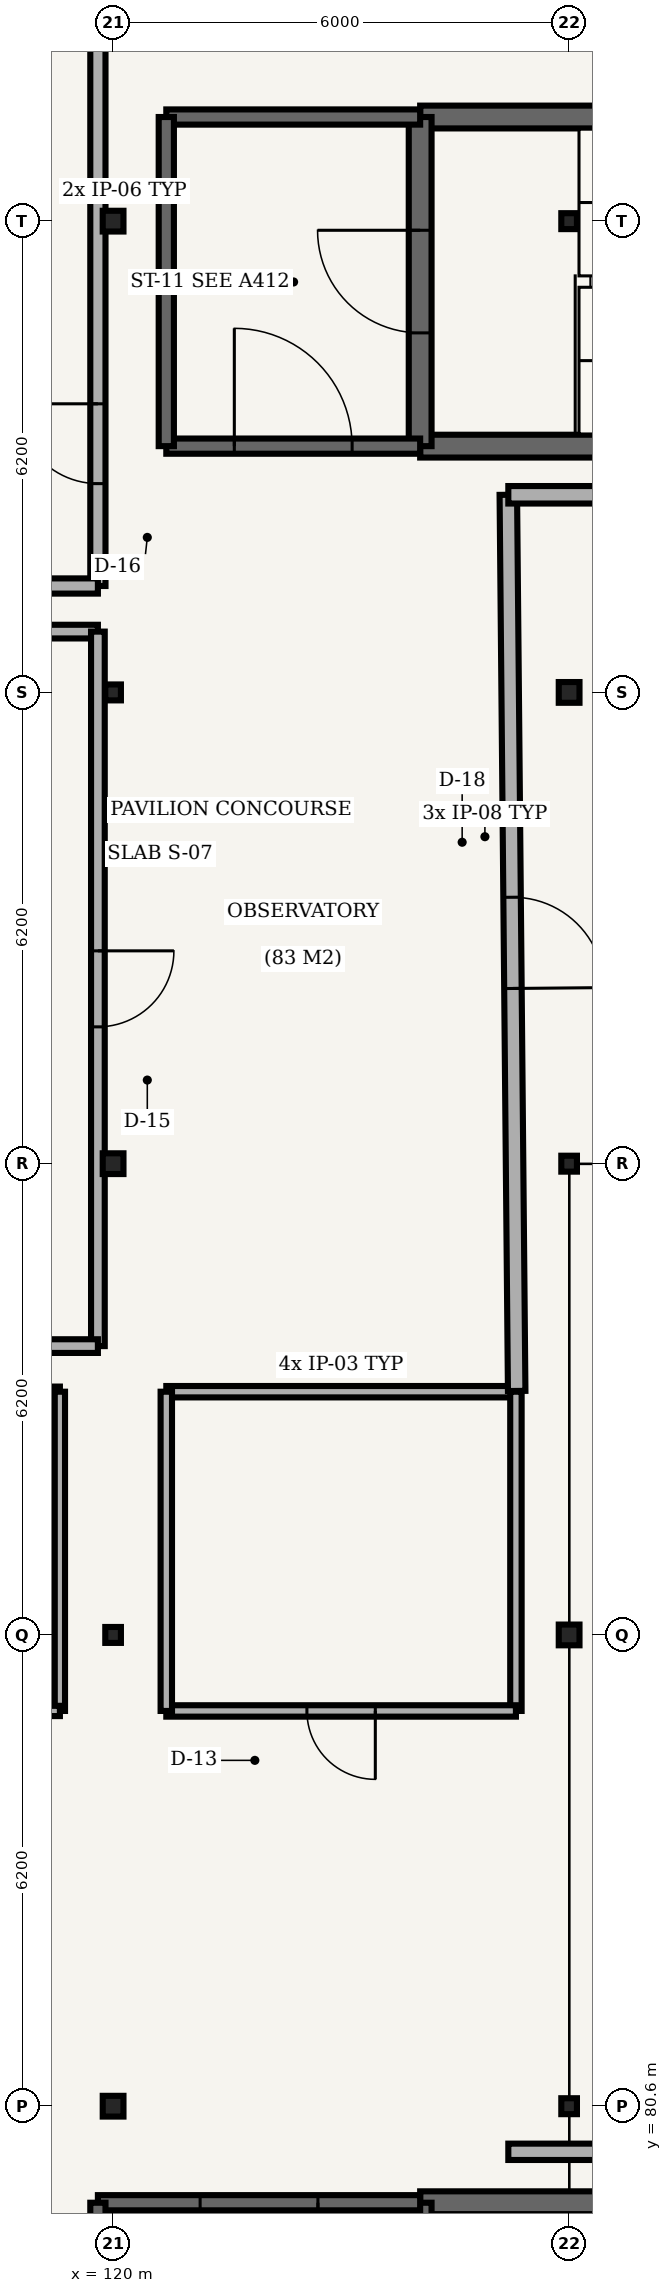
"""IFC4 building model, lengths in metres.
Left out: names, types, materials, properties, quantities, classifications, styles, units other than length and angle.
Written with IfcOpenShell. Run it as: python <this file> out.ifc"""

import sys

from ifc_helpers import new_model, si_unit, direction, frame, frame_2d, origin, origin_2d, place, context, subcontext, project, spatial, rectangle, hollow_circle, i_section, extrude, element, fill, save


model = new_model("IFC4")
c1 = context("Model", 3, precision=1e-05, world=origin(), true_north=direction((0.0, 1.0)))
c2 = subcontext(c1, "Body", "Model", "MODEL_VIEW")
j1 = project(units=[si_unit("LENGTHUNIT", "METRE"), si_unit("PLANEANGLEUNIT", "RADIAN")], contexts=[c1])
p1 = place(None, origin())
s1 = spatial("IfcSite", under=j1, at=p1, CompositionType="ELEMENT")
p2 = place(p1, origin())
s2 = spatial("IfcBuilding", under=s1, at=p2, CompositionType="ELEMENT")
p3 = place(p2, frame((0.0, 0.0, 25.2)))
s3 = spatial("IfcBuildingStorey", under=s2, at=p3, CompositionType="ELEMENT", Elevation=25.2)
p4 = place(p3, frame((120.0, 80.6, 0.0), z_axis=(0.0, 0.0, 1.0), x_axis=(1.0, 0.0, 0.0)))
e1 = element("IfcColumn", 1, at=p4, inside=s3, PredefinedType="COLUMN", context=c2, shape_type="SweptSolid", body=[
    extrude(hollow_circle(Radius=0.136, WallThickness=0.01, at=origin_2d()), origin(), (0.0, 0.0, 1.0), 4.41),
])
p5 = place(p3, frame((120.0, 86.8, 0.0), z_axis=(0.0, 0.0, 1.0), x_axis=(1.0, 0.0, 0.0)))
e2 = element("IfcColumn", 2, at=p5, inside=s3, PredefinedType="COLUMN", context=c2, shape_type="SweptSolid", body=[
    extrude(i_section(OverallWidth=0.206, OverallDepth=0.21, WebThickness=0.01, FlangeThickness=0.014, FilletRadius=0.01, at=origin_2d()), origin(), (0.0, 0.0, 1.0), 4.41),
])
p6 = place(p3, frame((120.0, 93.0, 0.0), z_axis=(0.0, 0.0, 1.0), x_axis=(1.0, 0.0, 0.0)))
e3 = element("IfcColumn", 3, at=p6, inside=s3, PredefinedType="COLUMN", context=c2, shape_type="SweptSolid", body=[
    extrude(hollow_circle(Radius=0.136, WallThickness=0.01, at=origin_2d()), origin(), (0.0, 0.0, 1.0), 4.41),
])
p7 = place(p3, frame((120.0, 99.2, 0.0), z_axis=(0.0, 0.0, 1.0), x_axis=(1.0, 0.0, 0.0)))
e4 = element("IfcColumn", 4, at=p7, inside=s3, PredefinedType="COLUMN", context=c2, shape_type="SweptSolid", body=[
    extrude(i_section(OverallWidth=0.206, OverallDepth=0.21, WebThickness=0.01, FlangeThickness=0.014, FilletRadius=0.01, at=origin_2d()), origin(), (0.0, 0.0, 1.0), 4.41),
])
p8 = place(p3, frame((120.0, 105.4, 0.0), z_axis=(0.0, 0.0, 1.0), x_axis=(1.0, 0.0, 0.0)))
e5 = element("IfcColumn", 5, at=p8, inside=s3, PredefinedType="COLUMN", context=c2, shape_type="SweptSolid", body=[
    extrude(hollow_circle(Radius=0.136, WallThickness=0.01, at=origin_2d()), origin(), (0.0, 0.0, 1.0), 4.41),
])
p9 = place(p3, frame((126.0, 80.6, 0.0), z_axis=(0.0, 0.0, 1.0), x_axis=(1.0, 0.0, 0.0)))
e6 = element("IfcColumn", 6, at=p9, inside=s3, PredefinedType="COLUMN", context=c2, shape_type="SweptSolid", body=[
    extrude(i_section(OverallWidth=0.206, OverallDepth=0.21, WebThickness=0.01, FlangeThickness=0.014, FilletRadius=0.01, at=origin_2d()), origin(), (0.0, 0.0, 1.0), 4.41),
])
p10 = place(p3, frame((126.0, 86.8, 0.0), z_axis=(0.0, 0.0, 1.0), x_axis=(1.0, 0.0, 0.0)))
e7 = element("IfcColumn", 7, at=p10, inside=s3, PredefinedType="COLUMN", context=c2, shape_type="SweptSolid", body=[
    extrude(hollow_circle(Radius=0.136, WallThickness=0.01, at=origin_2d()), origin(), (0.0, 0.0, 1.0), 4.41),
])
p11 = place(p3, frame((126.0, 93.0, 0.0), z_axis=(0.0, 0.0, 1.0), x_axis=(1.0, 0.0, 0.0)))
e8 = element("IfcColumn", 8, at=p11, inside=s3, PredefinedType="COLUMN", context=c2, shape_type="SweptSolid", body=[
    extrude(i_section(OverallWidth=0.206, OverallDepth=0.21, WebThickness=0.01, FlangeThickness=0.014, FilletRadius=0.01, at=origin_2d()), origin(), (0.0, 0.0, 1.0), 4.41),
])
p12 = place(p3, frame((126.0, 99.2, 0.0), z_axis=(0.0, 0.0, 1.0), x_axis=(1.0, 0.0, 0.0)))
e9 = element("IfcColumn", 9, at=p12, inside=s3, PredefinedType="COLUMN", context=c2, shape_type="SweptSolid", body=[
    extrude(hollow_circle(Radius=0.136, WallThickness=0.01, at=origin_2d()), origin(), (0.0, 0.0, 1.0), 4.41),
])
p13 = place(p3, frame((126.0, 105.4, 0.0), z_axis=(0.0, 0.0, 1.0), x_axis=(1.0, 0.0, 0.0)))
e10 = element("IfcColumn", 10, at=p13, inside=s3, PredefinedType="COLUMN", context=c2, shape_type="SweptSolid", body=[
    extrude(i_section(OverallWidth=0.206, OverallDepth=0.21, WebThickness=0.01, FlangeThickness=0.014, FilletRadius=0.01, at=origin_2d()), origin(), (0.0, 0.0, 1.0), 4.41),
])
p14 = place(p3, frame((132.56, 79.33, 0.0), z_axis=(0.0, 0.0, 1.0), x_axis=(-1.0, 0.0, 0.0)))
e11 = element("IfcWall", 11, at=p14, inside=s3, PredefinedType="SHEAR", context=c2, shape_type="SweptSolid", body=[
    extrude(rectangle(XDim=8.52, YDim=0.3, at=frame_2d((4.26, 0.0))), origin(), (0.0, 0.0, 1.0), 3.85),
])
p15 = place(p3, frame((124.04, 79.33, 0.0), z_axis=(0.0, 0.0, 1.0), x_axis=(0.0, -1.0, 0.0)))
e12 = element("IfcWall", 12, at=p15, inside=s3, PredefinedType="SHEAR", context=c2, shape_type="SweptSolid", body=[
    extrude(rectangle(XDim=4.29, YDim=0.3, at=frame_2d((2.145, 0.0))), origin(), (0.0, 0.0, 1.0), 3.85),
])
p16 = place(p15, frame((1.47, 0.0, 0.0)))
e13 = element("IfcOpeningElement", 13, at=p16, cuts=e12, PredefinedType="OPENING", context=c2, shape_type="SweptSolid", body=[
    extrude(rectangle(XDim=1.35, YDim=2.2, at=frame_2d((0.675, 1.1))), frame((0.0, 0.16, 0.0), z_axis=(0.0, -1.0, 0.0), x_axis=(1.0, 0.0, 0.0)), (0.0, 0.0, 1.0), 0.32),
])
p17 = place(p3, frame((124.04, 79.33, 0.0), z_axis=(0.0, 0.0, 1.0), x_axis=(-1.0, 0.0, 0.0)))
e14 = element("IfcWall", 14, at=p17, inside=s3, PredefinedType="SHEAR", context=c2, shape_type="SweptSolid", body=[
    extrude(rectangle(XDim=4.24, YDim=0.2, at=frame_2d((2.12, 0.0))), origin(), (0.0, 0.0, 1.0), 3.85),
])
p18 = place(p17, frame((1.345, 0.0, 0.0)))
e15 = element("IfcOpeningElement", 15, at=p18, cuts=e14, PredefinedType="OPENING", context=c2, shape_type="SweptSolid", body=[
    extrude(rectangle(XDim=1.55, YDim=2.2, at=frame_2d((0.775, 1.1))), frame((0.0, 0.11, 0.0), z_axis=(0.0, -1.0, 0.0), x_axis=(1.0, 0.0, 0.0)), (0.0, 0.0, 1.0), 0.22),
])
p19 = place(p3, frame((119.8, 79.33, 0.0), z_axis=(0.0, 0.0, 1.0), x_axis=(0.0, -1.0, 0.0)))
e16 = element("IfcWall", 16, at=p19, inside=s3, PredefinedType="SHEAR", context=c2, shape_type="SweptSolid", body=[
    extrude(rectangle(XDim=4.29, YDim=0.2, at=frame_2d((2.145, 0.0))), origin(), (0.0, 0.0, 1.0), 3.85),
])
for number, where, z_axis, x_axis in (
    (17, (124.04, 102.44, 0.0), (0.0, 0.0, 1.0), (1.0, 0.0, 0.0)),
    (18, (132.56, 106.77, 0.0), (0.0, 0.0, 1.0), (-1.0, 0.0, 0.0)),
):
    element("IfcWall", number, at=place(p3, frame(where, z_axis=z_axis, x_axis=x_axis)), inside=s3, PredefinedType="SHEAR", context=c2, shape_type="SweptSolid", body=[
        extrude(rectangle(XDim=8.52, YDim=0.3, at=frame_2d((4.26, 0.0))), origin(), (0.0, 0.0, 1.0), 3.85),
    ])
p20 = place(p3, frame((124.04, 106.77, 0.0), z_axis=(0.0, 0.0, 1.0), x_axis=(0.0, -1.0, 0.0)))
e19 = element("IfcWall", 19, at=p20, inside=s3, PredefinedType="SHEAR", context=c2, shape_type="SweptSolid", body=[
    extrude(rectangle(XDim=4.33, YDim=0.3, at=frame_2d((2.165, 0.0))), origin(), (0.0, 0.0, 1.0), 3.85),
])
p21 = place(p20, frame((1.49, 0.0, 0.0)))
e20 = element("IfcOpeningElement", 20, at=p21, cuts=e19, PredefinedType="OPENING", context=c2, shape_type="SweptSolid", body=[
    extrude(rectangle(XDim=1.35, YDim=2.2, at=frame_2d((0.675, 1.1))), frame((0.0, 0.16, 0.0), z_axis=(0.0, -1.0, 0.0), x_axis=(1.0, 0.0, 0.0)), (0.0, 0.0, 1.0), 0.32),
])
p22 = place(p3, frame((120.7, 102.44, 0.0), z_axis=(0.0, 0.0, 1.0), x_axis=(1.0, 0.0, 0.0)))
e21 = element("IfcWall", 21, at=p22, inside=s3, PredefinedType="SHEAR", context=c2, shape_type="SweptSolid", body=[
    extrude(rectangle(XDim=3.34, YDim=0.2, at=frame_2d((1.67, 0.0))), origin(), (0.0, 0.0, 1.0), 3.85),
])
p23 = place(p22, frame((0.895, 0.0, 0.0)))
e22 = element("IfcOpeningElement", 22, at=p23, cuts=e21, PredefinedType="OPENING", context=c2, shape_type="SweptSolid", body=[
    extrude(rectangle(XDim=1.55, YDim=2.2, at=frame_2d((0.775, 1.1))), frame((0.0, 0.11, 0.0), z_axis=(0.0, -1.0, 0.0), x_axis=(1.0, 0.0, 0.0)), (0.0, 0.0, 1.0), 0.22),
])
p24 = place(p3, frame((124.04, 106.77, 0.0), z_axis=(0.0, 0.0, 1.0), x_axis=(-1.0, 0.0, 0.0)))
e23 = element("IfcWall", 23, at=p24, inside=s3, PredefinedType="SHEAR", context=c2, shape_type="SweptSolid", body=[
    extrude(rectangle(XDim=3.34, YDim=0.2, at=frame_2d((1.67, 0.0))), origin(), (0.0, 0.0, 1.0), 3.85),
])
p25 = place(p3, frame((120.7, 106.77, 0.0), z_axis=(0.0, 0.0, 1.0), x_axis=(0.0, -1.0, 0.0)))
e24 = element("IfcWall", 24, at=p25, inside=s3, PredefinedType="SHEAR", context=c2, shape_type="SweptSolid", body=[
    extrude(rectangle(XDim=4.33, YDim=0.2, at=frame_2d((2.165, 0.0))), origin(), (0.0, 0.0, 1.0), 3.85),
])
p26 = place(p3, frame((114.7, 90.0, 0.0), z_axis=(0.0, 0.0, 1.0), x_axis=(1.0, 0.0, 0.0)))
e25 = element("IfcWall", 25, at=p26, inside=s3, PredefinedType="PARTITIONING", context=c2, shape_type="SweptSolid", body=[
    extrude(rectangle(XDim=4.6, YDim=0.135, at=frame_2d((2.3, 0.0))), origin(), (0.0, 0.0, 1.0), 3.85),
])
p27 = place(p3, frame((119.3, 90.0, 0.0), z_axis=(0.0, 0.0, 1.0), x_axis=(0.0, -1.0, 0.0)))
e26 = element("IfcWall", 26, at=p27, inside=s3, PredefinedType="PARTITIONING", context=c2, shape_type="SweptSolid", body=[
    extrude(rectangle(XDim=4.2, YDim=0.135, at=frame_2d((2.1, 0.0))), origin(), (0.0, 0.0, 1.0), 3.85),
])
p28 = place(p3, frame((119.3, 85.8, 0.0), z_axis=(0.0, 0.0, 1.0), x_axis=(-1.0, 0.0, 0.0)))
e27 = element("IfcWall", 27, at=p28, inside=s3, PredefinedType="PARTITIONING", context=c2, shape_type="SweptSolid", body=[
    extrude(rectangle(XDim=4.6, YDim=0.135, at=frame_2d((2.3, 0.0))), origin(), (0.0, 0.0, 1.0), 3.85),
])
p29 = place(p28, frame((1.05, 0.0, 0.0)))
e28 = element("IfcOpeningElement", 28, at=p29, cuts=e27, PredefinedType="OPENING", context=c2, shape_type="SweptSolid", body=[
    extrude(rectangle(XDim=2.5, YDim=2.1, at=frame_2d((1.25, 1.05))), frame((0.0, 0.077, 0.0), z_axis=(0.0, -1.0, 0.0), x_axis=(1.0, 0.0, 0.0)), (0.0, 0.0, 1.0), 0.155),
])
p30 = place(p3, frame((120.7, 90.0, 0.0), z_axis=(0.0, 0.0, 1.0), x_axis=(1.0, 0.0, 0.0)))
e29 = element("IfcWall", 29, at=p30, inside=s3, PredefinedType="PARTITIONING", context=c2, shape_type="SweptSolid", body=[
    extrude(rectangle(XDim=4.6, YDim=0.15, at=frame_2d((2.3, 0.0))), origin(), (0.0, 0.0, 1.0), 3.85),
])
p31 = place(p3, frame((125.3, 90.0, 0.0), z_axis=(0.0, 0.0, 1.0), x_axis=(0.0, -1.0, 0.0)))
e30 = element("IfcWall", 30, at=p31, inside=s3, PredefinedType="PARTITIONING", context=c2, shape_type="SweptSolid", body=[
    extrude(rectangle(XDim=4.2, YDim=0.15, at=frame_2d((2.1, 0.0))), origin(), (0.0, 0.0, 1.0), 3.85),
])
p32 = place(p3, frame((125.3, 85.8, 0.0), z_axis=(0.0, 0.0, 1.0), x_axis=(-1.0, 0.0, 0.0)))
e31 = element("IfcWall", 31, at=p32, inside=s3, PredefinedType="PARTITIONING", context=c2, shape_type="SweptSolid", body=[
    extrude(rectangle(XDim=4.6, YDim=0.15, at=frame_2d((2.3, 0.0))), origin(), (0.0, 0.0, 1.0), 3.85),
])
p33 = place(p32, frame((1.85, 0.0, 0.0)))
e32 = element("IfcOpeningElement", 32, at=p33, cuts=e31, PredefinedType="OPENING", context=c2, shape_type="SweptSolid", body=[
    extrude(rectangle(XDim=0.9, YDim=2.25, at=frame_2d((0.45, 1.125))), frame((0.0, 0.085, 0.0), z_axis=(0.0, -1.0, 0.0), x_axis=(1.0, 0.0, 0.0)), (0.0, 0.0, 1.0), 0.17),
])
p34 = place(p3, frame((120.7, 85.8, 0.0), z_axis=(0.0, 0.0, 1.0), x_axis=(0.0, 1.0, 0.0)))
e33 = element("IfcWall", 33, at=p34, inside=s3, PredefinedType="PARTITIONING", context=c2, shape_type="SweptSolid", body=[
    extrude(rectangle(XDim=4.2, YDim=0.15, at=frame_2d((2.1, 0.0))), origin(), (0.0, 0.0, 1.0), 3.85),
])
p35 = place(p3, frame((114.6, 100.0, 0.0), z_axis=(0.0, 0.0, 1.0), x_axis=(1.0, 0.0, 0.0)))
e34 = element("IfcWall", 34, at=p35, inside=s3, PredefinedType="PARTITIONING", context=c2, shape_type="SweptSolid", body=[
    extrude(rectangle(XDim=5.2, YDim=0.18, at=frame_2d((2.6, 0.0))), origin(), (0.0, 0.0, 1.0), 3.85),
])
p36 = place(p3, frame((119.8, 100.0, 0.0), z_axis=(0.0, 0.0, 1.0), x_axis=(0.0, -1.0, 0.0)))
e35 = element("IfcWall", 35, at=p36, inside=s3, PredefinedType="PARTITIONING", context=c2, shape_type="SweptSolid", body=[
    extrude(rectangle(XDim=9.4, YDim=0.18, at=frame_2d((4.7, 0.0))), origin(), (0.0, 0.0, 1.0), 3.85),
])
p37 = place(p36, frame((4.2, 0.0, 0.0)))
e36 = element("IfcOpeningElement", 36, at=p37, cuts=e35, PredefinedType="OPENING", context=c2, shape_type="SweptSolid", body=[
    extrude(rectangle(XDim=1.0, YDim=2.25, at=frame_2d((0.5, 1.125))), frame((0.0, 0.1, 0.0), z_axis=(0.0, -1.0, 0.0), x_axis=(1.0, 0.0, 0.0)), (0.0, 0.0, 1.0), 0.2),
])
p38 = place(p3, frame((119.8, 90.6, 0.0), z_axis=(0.0, 0.0, 1.0), x_axis=(-1.0, 0.0, 0.0)))
e37 = element("IfcWall", 37, at=p38, inside=s3, PredefinedType="PARTITIONING", context=c2, shape_type="SweptSolid", body=[
    extrude(rectangle(XDim=5.2, YDim=0.18, at=frame_2d((2.6, 0.0))), origin(), (0.0, 0.0, 1.0), 3.85),
])
p39 = place(p3, frame((119.8, 111.0, 0.0), z_axis=(0.0, 0.0, 1.0), x_axis=(0.0, -1.0, 0.0)))
e38 = element("IfcWall", 38, at=p39, inside=s3, PredefinedType="PARTITIONING", context=c2, shape_type="SweptSolid", body=[
    extrude(rectangle(XDim=10.4, YDim=0.2, at=frame_2d((5.2, 0.0))), origin(), (0.0, 0.0, 1.0), 3.85),
])
p40 = place(p39, frame((8.003, 0.0, 0.0)))
e39 = element("IfcOpeningElement", 39, at=p40, cuts=e38, PredefinedType="OPENING", context=c2, shape_type="SweptSolid", body=[
    extrude(rectangle(XDim=1.05, YDim=2.25, at=frame_2d((0.525, 1.125))), frame((0.0, 0.11, 0.0), z_axis=(0.0, -1.0, 0.0), x_axis=(1.0, 0.0, 0.0)), (0.0, 0.0, 1.0), 0.22),
])
p41 = place(p3, frame((119.8, 100.6, 0.0), z_axis=(0.0, 0.0, 1.0), x_axis=(-1.0, 0.0, 0.0)))
e40 = element("IfcWall", 40, at=p41, inside=s3, PredefinedType="PARTITIONING", context=c2, shape_type="SweptSolid", body=[
    extrude(rectangle(XDim=5.2, YDim=0.2, at=frame_2d((2.6, 0.0))), origin(), (0.0, 0.0, 1.0), 3.85),
])
p42 = place(p3, frame((125.2, 80.0, 0.0), z_axis=(0.0, 0.0, 1.0), x_axis=(1.0, 0.0, 0.0)))
e41 = element("IfcWall", 41, at=p42, inside=s3, PredefinedType="PARTITIONING", context=c2, shape_type="SweptSolid", body=[
    extrude(rectangle(XDim=8.6, YDim=0.215, at=frame_2d((4.3, 0.0))), origin(), (0.0, 0.0, 1.0), 3.85),
])
p43 = place(p42, frame((2.202, 0.0, 0.0)))
e42 = element("IfcOpeningElement", 42, at=p43, cuts=e41, PredefinedType="OPENING", context=c2, shape_type="SweptSolid", body=[
    extrude(rectangle(XDim=1.1, YDim=2.25, at=frame_2d((0.55, 1.125))), frame((0.0, 0.117, 0.0), z_axis=(0.0, -1.0, 0.0), x_axis=(1.0, 0.0, 0.0)), (0.0, 0.0, 1.0), 0.235),
])
p44 = place(p3, frame((125.31, 90.01, 0.0), z_axis=(0.0, 0.0, 1.0), x_axis=(-0.00933861372, 0.999956394196, 0.0)))
e43 = element("IfcWall", 43, at=p44, inside=s3, PredefinedType="PARTITIONING", context=c2, shape_type="SweptSolid", body=[
    extrude(rectangle(XDim=11.791, YDim=0.23, at=frame_2d((5.895, 0.0))), origin(), (0.0, 0.0, 1.0), 3.85),
])
p45 = place(p44, frame((5.295, 0.0, 0.0)))
e44 = element("IfcOpeningElement", 44, at=p45, cuts=e43, PredefinedType="OPENING", context=c2, shape_type="SweptSolid", body=[
    extrude(rectangle(XDim=1.2, YDim=2.25, at=frame_2d((0.6, 1.125))), frame((0.0, 0.125, 0.0), z_axis=(0.0, -1.0, 0.0), x_axis=(1.0, 0.0, 0.0)), (0.0, 0.0, 1.0), 0.25),
])
p46 = place(p3, frame((125.2, 101.8, 0.0), z_axis=(0.0, 0.0, 1.0), x_axis=(1.0, 0.0, 0.0)))
e45 = element("IfcWall", 45, at=p46, inside=s3, PredefinedType="PARTITIONING", context=c2, shape_type="SweptSolid", body=[
    extrude(rectangle(XDim=12.2, YDim=0.23, at=frame_2d((6.1, 0.0))), origin(), (0.0, 0.0, 1.0), 3.85),
])
p47 = place(p18, origin())
e46 = element("IfcDoor", 46, at=p47, inside=s3, OperationType="SINGLE_SWING_LEFT", PredefinedType="DOOR", context=c2, shape_type="SweptSolid", body=[
    extrude(rectangle(XDim=1.55, YDim=2.2, at=frame_2d((0.775, 1.1))), frame((0.0, 0.025, 0.0), z_axis=(0.0, -1.0, 0.0), x_axis=(1.0, 0.0, 0.0)), (0.0, 0.0, 1.0), 0.05),
])
fill(e15, e46)
p48 = place(p21, origin())
e47 = element("IfcDoor", 47, at=p48, inside=s3, OperationType="SINGLE_SWING_RIGHT", PredefinedType="DOOR", context=c2, shape_type="SweptSolid", body=[
    extrude(rectangle(XDim=1.35, YDim=2.2, at=frame_2d((0.675, 1.1))), frame((0.0, 0.025, 0.0), z_axis=(0.0, -1.0, 0.0), x_axis=(1.0, 0.0, 0.0)), (0.0, 0.0, 1.0), 0.05),
])
fill(e20, e47)
p49 = place(p23, origin())
e48 = element("IfcDoor", 48, at=p49, inside=s3, OperationType="SINGLE_SWING_LEFT", PredefinedType="DOOR", context=c2, shape_type="SweptSolid", body=[
    extrude(rectangle(XDim=1.55, YDim=2.2, at=frame_2d((0.775, 1.1))), frame((0.0, 0.025, 0.0), z_axis=(0.0, -1.0, 0.0), x_axis=(1.0, 0.0, 0.0)), (0.0, 0.0, 1.0), 0.05),
])
fill(e22, e48)
p50 = place(p33, origin())
e49 = element("IfcDoor", 49, at=p50, inside=s3, OperationType="SINGLE_SWING_LEFT", PredefinedType="DOOR", context=c2, shape_type="SweptSolid", body=[
    extrude(rectangle(XDim=0.9, YDim=2.25, at=frame_2d((0.45, 1.125))), frame((0.0, 0.025, 0.0), z_axis=(0.0, -1.0, 0.0), x_axis=(1.0, 0.0, 0.0)), (0.0, 0.0, 1.0), 0.05),
])
fill(e32, e49)
p51 = place(p37, origin())
e50 = element("IfcDoor", 50, at=p51, inside=s3, OperationType="SINGLE_SWING_LEFT", PredefinedType="DOOR", context=c2, shape_type="SweptSolid", body=[
    extrude(rectangle(XDim=1.0, YDim=2.25, at=frame_2d((0.5, 1.125))), frame((0.0, 0.025, 0.0), z_axis=(0.0, -1.0, 0.0), x_axis=(1.0, 0.0, 0.0)), (0.0, 0.0, 1.0), 0.05),
])
fill(e36, e50)
p52 = place(p40, origin())
e51 = element("IfcDoor", 51, at=p52, inside=s3, OperationType="SINGLE_SWING_RIGHT", PredefinedType="DOOR", context=c2, shape_type="SweptSolid", body=[
    extrude(rectangle(XDim=1.05, YDim=2.25, at=frame_2d((0.525, 1.125))), frame((0.0, 0.025, 0.0), z_axis=(0.0, -1.0, 0.0), x_axis=(1.0, 0.0, 0.0)), (0.0, 0.0, 1.0), 0.05),
])
fill(e39, e51)
p53 = place(p45, origin())
e52 = element("IfcDoor", 52, at=p53, inside=s3, OperationType="SINGLE_SWING_RIGHT", PredefinedType="DOOR", context=c2, shape_type="SweptSolid", body=[
    extrude(rectangle(XDim=1.2, YDim=2.25, at=frame_2d((0.6, 1.125))), frame((0.0, 0.025, 0.0), z_axis=(0.0, -1.0, 0.0), x_axis=(1.0, 0.0, 0.0)), (0.0, 0.0, 1.0), 0.05),
])
fill(e44, e52)
save(model, sys.argv[1])
